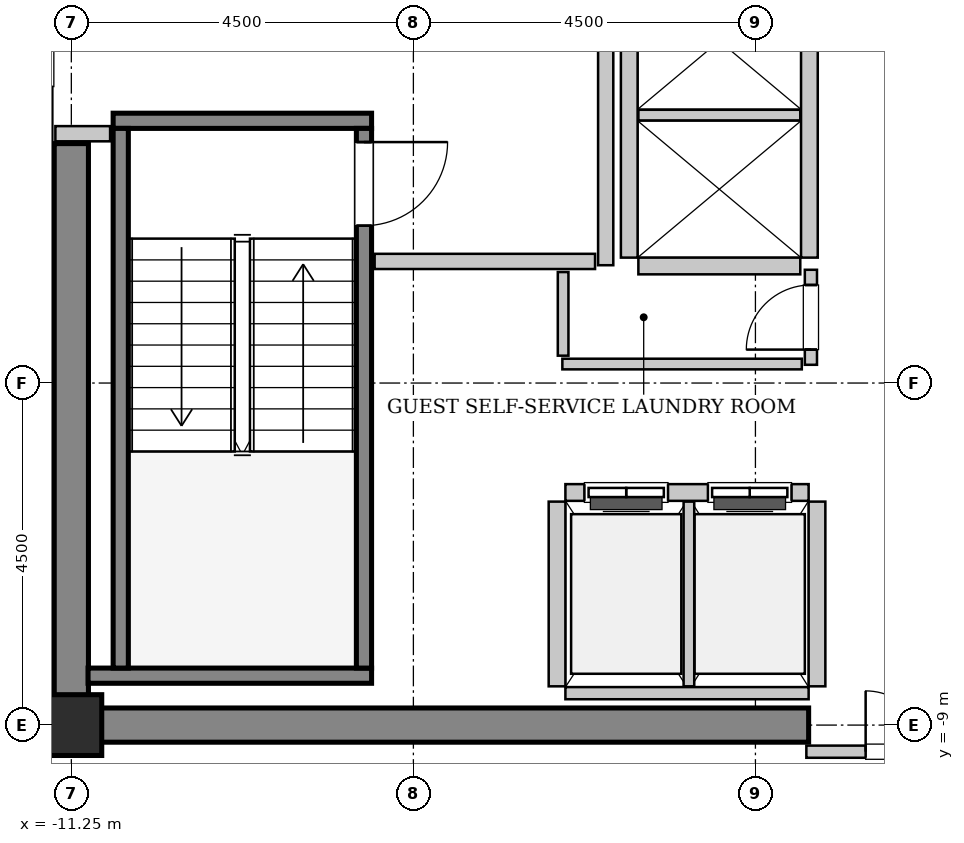
"""IFC4 building model, lengths in metres.
Left out: names, types, materials, properties, quantities, classifications, styles, units other than length and angle.
Written with IfcOpenShell. Run it as: python <this file> out.ifc"""

import sys

from ifc_helpers import new_model, si_unit, direction, frame, frame_2d, origin, origin_2d, place, context, subcontext, project, spatial, rectangle, hollow_rectangle, extrude, source, transform, mapped, element, fill, save


model = new_model("IFC4")
c1 = context("Model", 3, precision=1e-05, world=origin(), true_north=direction((0.0, 1.0)))
c2 = subcontext(c1, "Body", "Model", "MODEL_VIEW")
j1 = project(units=[si_unit("LENGTHUNIT", "METRE"), si_unit("PLANEANGLEUNIT", "RADIAN")], contexts=[c1])
p1 = place(None, origin())
s1 = spatial("IfcSite", under=j1, at=p1, CompositionType="ELEMENT")
p2 = place(p1, origin())
s2 = spatial("IfcBuilding", under=s1, at=p2, CompositionType="ELEMENT")
p3 = place(p2, frame((0.0, 0.0, 221.8)))
s3 = spatial("IfcBuildingStorey", under=s2, at=p3, CompositionType="ELEMENT", Elevation=221.8)
m1 = source(origin(), c2, "Body", "SweptSolid", [
    extrude(rectangle(XDim=9.925, YDim=0.45, at=frame_2d((4.962, 0.0))), origin(), (0.0, 0.0, 1.0), 3.8),
])
p4 = place(p3, frame((-11.475, -9.0, 0.0), z_axis=(0.0, 0.0, 1.0), x_axis=(1.0, 0.0, 0.0)))
e1 = element("IfcWall", 1, at=p4, inside=s3, PredefinedType="SHEAR", context=c2, shape_type="MappedRepresentation", body=[
    mapped(m1, transform((0.0, 0.0, 0.0), x_axis=(1.0, 0.0, 0.0), y_axis=(0.0, 1.0, 0.0), z_axis=(0.0, 0.0, 1.0), scale=1.0)),
])
m2 = source(origin(), c2, "Body", "SweptSolid", [
    extrude(rectangle(XDim=7.425, YDim=0.45, at=frame_2d((3.712, 0.0))), origin(), (0.0, 0.0, 1.0), 3.8),
])
p5 = place(p3, frame((-11.25, -8.775, 0.0), z_axis=(0.0, 0.0, 1.0), x_axis=(0.0, 1.0, 0.0)))
e2 = element("IfcWall", 2, at=p5, inside=s3, PredefinedType="SHEAR", context=c2, shape_type="MappedRepresentation", body=[
    mapped(m2, transform((0.0, 0.0, 0.0), x_axis=(1.0, 0.0, 0.0), y_axis=(0.0, 1.0, 0.0), z_axis=(0.0, 0.0, 1.0), scale=1.0)),
])
m3 = source(origin(), c2, "Body", "SweptSolid", [
    extrude(hollow_rectangle(XDim=0.8, YDim=0.8, WallThickness=0.04, InnerFilletRadius=0.04, OuterFilletRadius=0.08, at=origin_2d()), origin(), (0.0, 0.0, 1.0), 3.8),
])
p6 = place(p3, frame((-11.25, -9.0, 0.0), z_axis=(0.0, 0.0, 1.0), x_axis=(1.0, 0.0, 0.0)))
e3 = element("IfcColumn", 3, at=p6, inside=s3, PredefinedType="COLUMN", context=c2, shape_type="MappedRepresentation", body=[
    mapped(m3, transform((0.0, 0.0, 0.0), x_axis=(1.0, 0.0, 0.0), y_axis=(0.0, 1.0, 0.0), z_axis=(0.0, 0.0, 1.0), scale=1.0)),
])
m4 = source(origin(), c2, "Body", "SweptSolid", [
    extrude(rectangle(XDim=3.4, YDim=0.2, at=frame_2d((1.7, 0.0))), origin(), (0.0, 0.0, 1.0), 3.8),
])
p7 = place(p3, frame((-10.7, -1.05, 0.0), z_axis=(0.0, 0.0, 1.0), x_axis=(1.0, 0.0, 0.0)))
e4 = element("IfcWall", 4, at=p7, inside=s3, PredefinedType="SOLIDWALL", context=c2, shape_type="MappedRepresentation", body=[
    mapped(m4, transform((0.0, 0.0, 0.0), x_axis=(1.0, 0.0, 0.0), y_axis=(0.0, 1.0, 0.0), z_axis=(0.0, 0.0, 1.0), scale=1.0)),
])
m5 = source(origin(), c2, "Body", "SweptSolid", [
    extrude(rectangle(XDim=3.73, YDim=0.2, at=frame_2d((1.865, 0.0))), origin(), (0.0, 0.0, 1.0), 3.8),
])
p8 = place(p3, frame((-11.03, -8.35, 0.0), z_axis=(0.0, 0.0, 1.0), x_axis=(1.0, 0.0, 0.0)))
e5 = element("IfcWall", 5, at=p8, inside=s3, PredefinedType="SOLIDWALL", context=c2, shape_type="MappedRepresentation", body=[
    mapped(m5, transform((0.0, 0.0, 0.0), x_axis=(1.0, 0.0, 0.0), y_axis=(0.0, 1.0, 0.0), z_axis=(0.0, 0.0, 1.0), scale=1.0)),
])
m6 = source(origin(), c2, "Body", "SweptSolid", [
    extrude(rectangle(XDim=7.1, YDim=0.2, at=frame_2d((3.55, 0.0))), origin(), (0.0, 0.0, 1.0), 3.8),
])
p9 = place(p3, frame((-10.6, -1.15, 0.0), z_axis=(0.0, 0.0, 1.0), x_axis=(0.0, -1.0, 0.0)))
e6 = element("IfcWall", 6, at=p9, inside=s3, PredefinedType="SOLIDWALL", context=c2, shape_type="MappedRepresentation", body=[
    mapped(m6, transform((0.0, 0.0, 0.0), x_axis=(1.0, 0.0, 0.0), y_axis=(0.0, 1.0, 0.0), z_axis=(0.0, 0.0, 1.0), scale=1.0)),
])
p10 = place(p3, frame((-7.4, -1.15, 0.0), z_axis=(0.0, 0.0, 1.0), x_axis=(0.0, -1.0, 0.0)))
e7 = element("IfcWall", 7, at=p10, inside=s3, PredefinedType="SOLIDWALL", context=c2, shape_type="MappedRepresentation", body=[
    mapped(m6, transform((0.0, 0.0, 0.0), x_axis=(1.0, 0.0, 0.0), y_axis=(0.0, 1.0, 0.0), z_axis=(0.0, 0.0, 1.0), scale=1.0)),
])
p11 = place(p10, frame((0.18, 0.0, 0.0)))
e8 = element("IfcOpeningElement", 8, at=p11, cuts=e7, PredefinedType="OPENING", context=c2, shape_type="SweptSolid", body=[
    extrude(rectangle(XDim=1.1, YDim=2.15, at=frame_2d((0.55, 1.075))), frame((0.0, 0.11, 0.0), z_axis=(0.0, -1.0, 0.0), x_axis=(1.0, 0.0, 0.0)), (0.0, 0.0, 1.0), 0.22),
])
m7 = source(origin(), c2, "Body", "SweptSolid", [
    extrude(rectangle(XDim=3.2, YDim=0.22, at=frame_2d((1.6, 0.0))), origin(), (0.0, 0.0, 1.0), 3.535),
])
p12 = place(p3, frame((-1.55, -5.94, 0.0), z_axis=(0.0, 0.0, 1.0), x_axis=(-1.0, 0.0, 0.0)))
e9 = element("IfcWall", 9, at=p12, inside=s3, PredefinedType="SOLIDWALL", context=c2, shape_type="MappedRepresentation", body=[
    mapped(m7, transform((0.0, 0.0, 0.0), x_axis=(1.0, 0.0, 0.0), y_axis=(0.0, 1.0, 0.0), z_axis=(0.0, 0.0, 1.0), scale=1.0)),
])
p13 = place(p12, frame((1.85, 0.0, 0.0)))
e10 = element("IfcOpeningElement", 10, at=p13, cuts=e9, PredefinedType="OPENING", context=c2, shape_type="SweptSolid", body=[
    extrude(rectangle(XDim=1.1, YDim=2.2, at=frame_2d((0.55, 1.1))), frame((0.0, 0.12, 0.0), z_axis=(0.0, -1.0, 0.0), x_axis=(1.0, 0.0, 0.0)), (0.0, 0.0, 1.0), 0.24),
])
p14 = place(p12, frame((0.225, 0.0, 0.0)))
e11 = element("IfcOpeningElement", 11, at=p14, cuts=e9, PredefinedType="OPENING", context=c2, shape_type="SweptSolid", body=[
    extrude(rectangle(XDim=1.1, YDim=2.2, at=frame_2d((0.55, 1.1))), frame((0.0, 0.12, 0.0), z_axis=(0.0, -1.0, 0.0), x_axis=(1.0, 0.0, 0.0)), (0.0, 0.0, 1.0), 0.24),
])
m8 = source(origin(), c2, "Body", "SweptSolid", [
    extrude(rectangle(XDim=3.2, YDim=0.16, at=frame_2d((1.6, 0.0))), origin(), (0.0, 0.0, 1.0), 2.625),
])
p15 = place(p3, frame((-4.75, -8.58, 0.0), z_axis=(0.0, 0.0, 1.0), x_axis=(1.0, 0.0, 0.0)))
e12 = element("IfcWall", 12, at=p15, inside=s3, PredefinedType="PARTITIONING", context=c2, shape_type="MappedRepresentation", body=[
    mapped(m8, transform((0.0, 0.0, 0.0), x_axis=(1.0, 0.0, 0.0), y_axis=(0.0, 1.0, 0.0), z_axis=(0.0, 0.0, 1.0), scale=1.0)),
])
m9 = source(origin(), c2, "Body", "SweptSolid", [
    extrude(rectangle(XDim=2.43, YDim=0.22, at=frame_2d((1.215, 0.0))), origin(), (0.0, 0.0, 1.0), 3.535),
])
p16 = place(p3, frame((-4.86, -6.06, 0.0), z_axis=(0.0, 0.0, 1.0), x_axis=(0.0, -1.0, 0.0)))
e13 = element("IfcWall", 13, at=p16, inside=s3, PredefinedType="SOLIDWALL", context=c2, shape_type="MappedRepresentation", body=[
    mapped(m9, transform((0.0, 0.0, 0.0), x_axis=(1.0, 0.0, 0.0), y_axis=(0.0, 1.0, 0.0), z_axis=(0.0, 0.0, 1.0), scale=1.0)),
])
m10 = source(origin(), c2, "Body", "SweptSolid", [
    extrude(rectangle(XDim=2.43, YDim=0.14, at=frame_2d((1.215, 0.0))), origin(), (0.0, 0.0, 1.0), 3.535),
])
p17 = place(p3, frame((-3.125, -8.49, 0.0), z_axis=(0.0, 0.0, 1.0), x_axis=(0.0, 1.0, 0.0)))
e14 = element("IfcWall", 14, at=p17, inside=s3, PredefinedType="PARTITIONING", context=c2, shape_type="MappedRepresentation", body=[
    mapped(m10, transform((0.0, 0.0, 0.0), x_axis=(1.0, 0.0, 0.0), y_axis=(0.0, 1.0, 0.0), z_axis=(0.0, 0.0, 1.0), scale=1.0)),
])
p18 = place(p3, frame((-1.44, -8.49, 0.0), z_axis=(0.0, 0.0, 1.0), x_axis=(0.0, 1.0, 0.0)))
e15 = element("IfcWall", 15, at=p18, inside=s3, PredefinedType="SOLIDWALL", context=c2, shape_type="MappedRepresentation", body=[
    mapped(m9, transform((0.0, 0.0, 0.0), x_axis=(1.0, 0.0, 0.0), y_axis=(0.0, 1.0, 0.0), z_axis=(0.0, 0.0, 1.0), scale=1.0)),
])
m11 = source(origin(), c2, "Body", "SweptSolid", [
    extrude(rectangle(XDim=5.7, YDim=0.22, at=frame_2d((2.85, 0.0))), origin(), (0.0, 0.0, 1.0), 3.535),
])
for number, where, z_axis, x_axis in (
    (16, (-1.54, -2.85, 0.0), (0.0, 0.0, 1.0), (0.0, 1.0, 0.0)),
    (17, (-3.91, 2.85, 0.0), (0.0, 0.0, 1.0), (0.0, -1.0, 0.0)),
):
    element("IfcWall", number, at=place(p3, frame(where, z_axis=z_axis, x_axis=x_axis)), inside=s3, PredefinedType="SOLIDWALL", context=c2, shape_type="MappedRepresentation", body=[
        mapped(m11, transform((0.0, 0.0, 0.0), x_axis=(1.0, 0.0, 0.0), y_axis=(0.0, 1.0, 0.0), z_axis=(0.0, 0.0, 1.0), scale=1.0)),
    ])
m12 = source(origin(), c2, "Body", "SweptSolid", [
    extrude(rectangle(XDim=2.13, YDim=0.22, at=frame_2d((1.065, 0.0))), origin(), (0.0, 0.0, 1.0), 3.535),
])
p19 = place(p3, frame((-3.79, -2.96, 0.0), z_axis=(0.0, 0.0, 1.0), x_axis=(1.0, 0.0, 0.0)))
e18 = element("IfcWall", 18, at=p19, inside=s3, PredefinedType="SOLIDWALL", context=c2, shape_type="MappedRepresentation", body=[
    mapped(m12, transform((0.0, 0.0, 0.0), x_axis=(1.0, 0.0, 0.0), y_axis=(0.0, 1.0, 0.0), z_axis=(0.0, 0.0, 1.0), scale=1.0)),
])
m13 = source(origin(), c2, "Body", "SweptSolid", [
    extrude(rectangle(XDim=2.13, YDim=0.14, at=frame_2d((1.065, 0.0))), origin(), (0.0, 0.0, 1.0), 3.535),
])
p20 = place(p3, frame((-3.79, -0.975, 0.0), z_axis=(0.0, 0.0, 1.0), x_axis=(1.0, 0.0, 0.0)))
e19 = element("IfcWall", 19, at=p20, inside=s3, PredefinedType="PARTITIONING", context=c2, shape_type="MappedRepresentation", body=[
    mapped(m13, transform((0.0, 0.0, 0.0), x_axis=(1.0, 0.0, 0.0), y_axis=(0.0, 1.0, 0.0), z_axis=(0.0, 0.0, 1.0), scale=1.0)),
])
m14 = source(origin(), c2, "Body", "SweptSolid", [
    extrude(rectangle(XDim=5.9, YDim=0.2, at=frame_2d((2.95, 0.0))), origin(), (0.0, 0.0, 1.0), 3.535),
])
p21 = place(p3, frame((-4.22, -2.95, 0.0), z_axis=(0.0, 0.0, 1.0), x_axis=(0.0, 1.0, 0.0)))
e20 = element("IfcWall", 20, at=p21, inside=s3, PredefinedType="PARTITIONING", context=c2, shape_type="MappedRepresentation", body=[
    mapped(m14, transform((0.0, 0.0, 0.0), x_axis=(1.0, 0.0, 0.0), y_axis=(0.0, 1.0, 0.0), z_axis=(0.0, 0.0, 1.0), scale=1.0)),
])
m15 = source(origin(), c2, "Body", "SweptSolid", [
    extrude(rectangle(XDim=2.9, YDim=0.2, at=frame_2d((1.45, 0.0))), origin(), (0.0, 0.0, 1.0), 3.535),
])
p22 = place(p3, frame((-7.26, -2.9, 0.0), z_axis=(0.0, 0.0, 1.0), x_axis=(1.0, 0.0, 0.0)))
e21 = element("IfcWall", 21, at=p22, inside=s3, PredefinedType="PARTITIONING", context=c2, shape_type="MappedRepresentation", body=[
    mapped(m15, transform((0.0, 0.0, 0.0), x_axis=(1.0, 0.0, 0.0), y_axis=(0.0, 1.0, 0.0), z_axis=(0.0, 0.0, 1.0), scale=1.0)),
])
m16 = source(origin(), c2, "Body", "SweptSolid", [
    extrude(rectangle(XDim=0.72, YDim=0.2, at=frame_2d((0.36, 0.0))), origin(), (0.0, 0.0, 1.0), 3.535),
])
p23 = place(p3, frame((-11.46, -1.22, 0.0), z_axis=(0.0, 0.0, 1.0), x_axis=(1.0, 0.0, 0.0)))
e22 = element("IfcWall", 22, at=p23, inside=s3, PredefinedType="PARTITIONING", context=c2, shape_type="MappedRepresentation", body=[
    mapped(m16, transform((0.0, 0.0, 0.0), x_axis=(1.0, 0.0, 0.0), y_axis=(0.0, 1.0, 0.0), z_axis=(0.0, 0.0, 1.0), scale=1.0)),
])
m17 = source(origin(), c2, "Body", "SweptSolid", [
    extrude(rectangle(XDim=3.16, YDim=0.16, at=frame_2d((1.58, 0.0))), origin(), (0.0, 0.0, 1.0), 2.625),
])
p24 = place(p3, frame((-1.58, -9.35, 0.0), z_axis=(0.0, 0.0, 1.0), x_axis=(1.0, 0.0, 0.0)))
e23 = element("IfcWall", 23, at=p24, inside=s3, PredefinedType="PARTITIONING", context=c2, shape_type="MappedRepresentation", body=[
    mapped(m17, transform((0.0, 0.0, 0.0), x_axis=(1.0, 0.0, 0.0), y_axis=(0.0, 1.0, 0.0), z_axis=(0.0, 0.0, 1.0), scale=1.0)),
])
p25 = place(p24, frame((0.78, 0.0, 0.0)))
e24 = element("IfcOpeningElement", 24, at=p25, cuts=e23, PredefinedType="OPENING", context=c2, shape_type="SweptSolid", body=[
    extrude(rectangle(XDim=1.6, YDim=2.3, at=frame_2d((0.8, 1.15))), frame((0.0, 0.09, 0.0), z_axis=(0.0, -1.0, 0.0), x_axis=(1.0, 0.0, 0.0)), (0.0, 0.0, 1.0), 0.18),
])
m18 = source(origin(), c2, "Body", "SweptSolid", [
    extrude(rectangle(XDim=1.25, YDim=0.16, at=frame_2d((0.625, 0.0))), origin(), (0.0, 0.0, 1.0), 3.535),
])
p26 = place(p3, frame((-1.52, -4.26, 0.0), z_axis=(0.0, 0.0, 1.0), x_axis=(0.0, 1.0, 0.0)))
e25 = element("IfcWall", 25, at=p26, inside=s3, PredefinedType="PARTITIONING", context=c2, shape_type="MappedRepresentation", body=[
    mapped(m18, transform((0.0, 0.0, 0.0), x_axis=(1.0, 0.0, 0.0), y_axis=(0.0, 1.0, 0.0), z_axis=(0.0, 0.0, 1.0), scale=1.0)),
])
p27 = place(p26, frame((0.2, 0.0, 0.0)))
e26 = element("IfcOpeningElement", 26, at=p27, cuts=e25, PredefinedType="OPENING", context=c2, shape_type="SweptSolid", body=[
    extrude(rectangle(XDim=0.85, YDim=2.1, at=frame_2d((0.425, 1.05))), frame((0.0, 0.09, 0.0), z_axis=(0.0, -1.0, 0.0), x_axis=(1.0, 0.0, 0.0)), (0.0, 0.0, 1.0), 0.18),
])
m19 = source(origin(), c2, "Body", "SweptSolid", [
    extrude(rectangle(XDim=3.15, YDim=0.14, at=frame_2d((1.575, 0.0))), origin(), (0.0, 0.0, 1.0), 3.535),
])
p28 = place(p3, frame((-4.79, -4.25, 0.0), z_axis=(0.0, 0.0, 1.0), x_axis=(1.0, 0.0, 0.0)))
e27 = element("IfcWall", 27, at=p28, inside=s3, PredefinedType="PARTITIONING", context=c2, shape_type="MappedRepresentation", body=[
    mapped(m19, transform((0.0, 0.0, 0.0), x_axis=(1.0, 0.0, 0.0), y_axis=(0.0, 1.0, 0.0), z_axis=(0.0, 0.0, 1.0), scale=1.0)),
])
m20 = source(origin(), c2, "Body", "SweptSolid", [
    extrude(rectangle(XDim=1.1, YDim=0.14, at=frame_2d((0.55, 0.0))), origin(), (0.0, 0.0, 1.0), 3.535),
])
p29 = place(p3, frame((-4.78, -4.14, 0.0), z_axis=(0.0, 0.0, 1.0), x_axis=(0.0, 1.0, 0.0)))
e28 = element("IfcWall", 28, at=p29, inside=s3, PredefinedType="PARTITIONING", context=c2, shape_type="MappedRepresentation", body=[
    mapped(m20, transform((0.0, 0.0, 0.0), x_axis=(1.0, 0.0, 0.0), y_axis=(0.0, 1.0, 0.0), z_axis=(0.0, 0.0, 1.0), scale=1.0)),
])
m21 = source(origin(), c2, "Body", "SweptSolid", [
    extrude(rectangle(XDim=1.1, YDim=2.15, at=frame_2d((0.55, 1.075))), frame((0.0, 0.025, 0.0), z_axis=(0.0, -1.0, 0.0), x_axis=(1.0, 0.0, 0.0)), (0.0, 0.0, 1.0), 0.05),
])
p30 = place(p11, origin())
e29 = element("IfcDoor", 29, at=p30, inside=s3, OperationType="SINGLE_SWING_LEFT", PredefinedType="DOOR", context=c2, shape_type="MappedRepresentation", body=[
    mapped(m21, transform((0.0, 0.0, 0.0), x_axis=(1.0, 0.0, 0.0), y_axis=(0.0, 1.0, 0.0), z_axis=(0.0, 0.0, 1.0), scale=1.0)),
])
fill(e8, e29)
m22 = source(origin(), c2, "Body", "SweptSolid", [
    extrude(rectangle(XDim=1.1, YDim=2.2, at=frame_2d((0.55, 1.1))), frame((0.0, 0.025, 0.0), z_axis=(0.0, -1.0, 0.0), x_axis=(1.0, 0.0, 0.0)), (0.0, 0.0, 1.0), 0.05),
])
p31 = place(p13, origin())
e30 = element("IfcDoor", 30, at=p31, inside=s3, OperationType="DOUBLE_DOOR_SLIDING", PredefinedType="DOOR", context=c2, shape_type="MappedRepresentation", body=[
    mapped(m22, transform((0.0, 0.0, 0.0), x_axis=(1.0, 0.0, 0.0), y_axis=(0.0, 1.0, 0.0), z_axis=(0.0, 0.0, 1.0), scale=1.0)),
])
fill(e10, e30)
p32 = place(p14, origin())
e31 = element("IfcDoor", 31, at=p32, inside=s3, OperationType="DOUBLE_DOOR_SLIDING", PredefinedType="DOOR", context=c2, shape_type="MappedRepresentation", body=[
    mapped(m22, transform((0.0, 0.0, 0.0), x_axis=(1.0, 0.0, 0.0), y_axis=(0.0, 1.0, 0.0), z_axis=(0.0, 0.0, 1.0), scale=1.0)),
])
fill(e11, e31)
m23 = source(origin(), c2, "Body", "SweptSolid", [
    extrude(rectangle(XDim=1.6, YDim=2.3, at=frame_2d((0.8, 1.15))), frame((0.0, 0.025, 0.0), z_axis=(0.0, -1.0, 0.0), x_axis=(1.0, 0.0, 0.0)), (0.0, 0.0, 1.0), 0.05),
])
p33 = place(p25, origin())
e32 = element("IfcDoor", 32, at=p33, inside=s3, OperationType="DOUBLE_DOOR_SINGLE_SWING", PredefinedType="DOOR", context=c2, shape_type="MappedRepresentation", body=[
    mapped(m23, transform((0.0, 0.0, 0.0), x_axis=(1.0, 0.0, 0.0), y_axis=(0.0, 1.0, 0.0), z_axis=(0.0, 0.0, 1.0), scale=1.0)),
])
fill(e24, e32)
m24 = source(origin(), c2, "Body", "SweptSolid", [
    extrude(rectangle(XDim=0.85, YDim=2.1, at=frame_2d((0.425, 1.05))), frame((0.0, 0.025, 0.0), z_axis=(0.0, -1.0, 0.0), x_axis=(1.0, 0.0, 0.0)), (0.0, 0.0, 1.0), 0.05),
])
p34 = place(p27, origin())
e33 = element("IfcDoor", 33, at=p34, inside=s3, OperationType="SINGLE_SWING_LEFT", PredefinedType="DOOR", context=c2, shape_type="MappedRepresentation", body=[
    mapped(m24, transform((0.0, 0.0, 0.0), x_axis=(1.0, 0.0, 0.0), y_axis=(0.0, 1.0, 0.0), z_axis=(0.0, 0.0, 1.0), scale=1.0)),
])
fill(e26, e33)
save(model, sys.argv[1])
